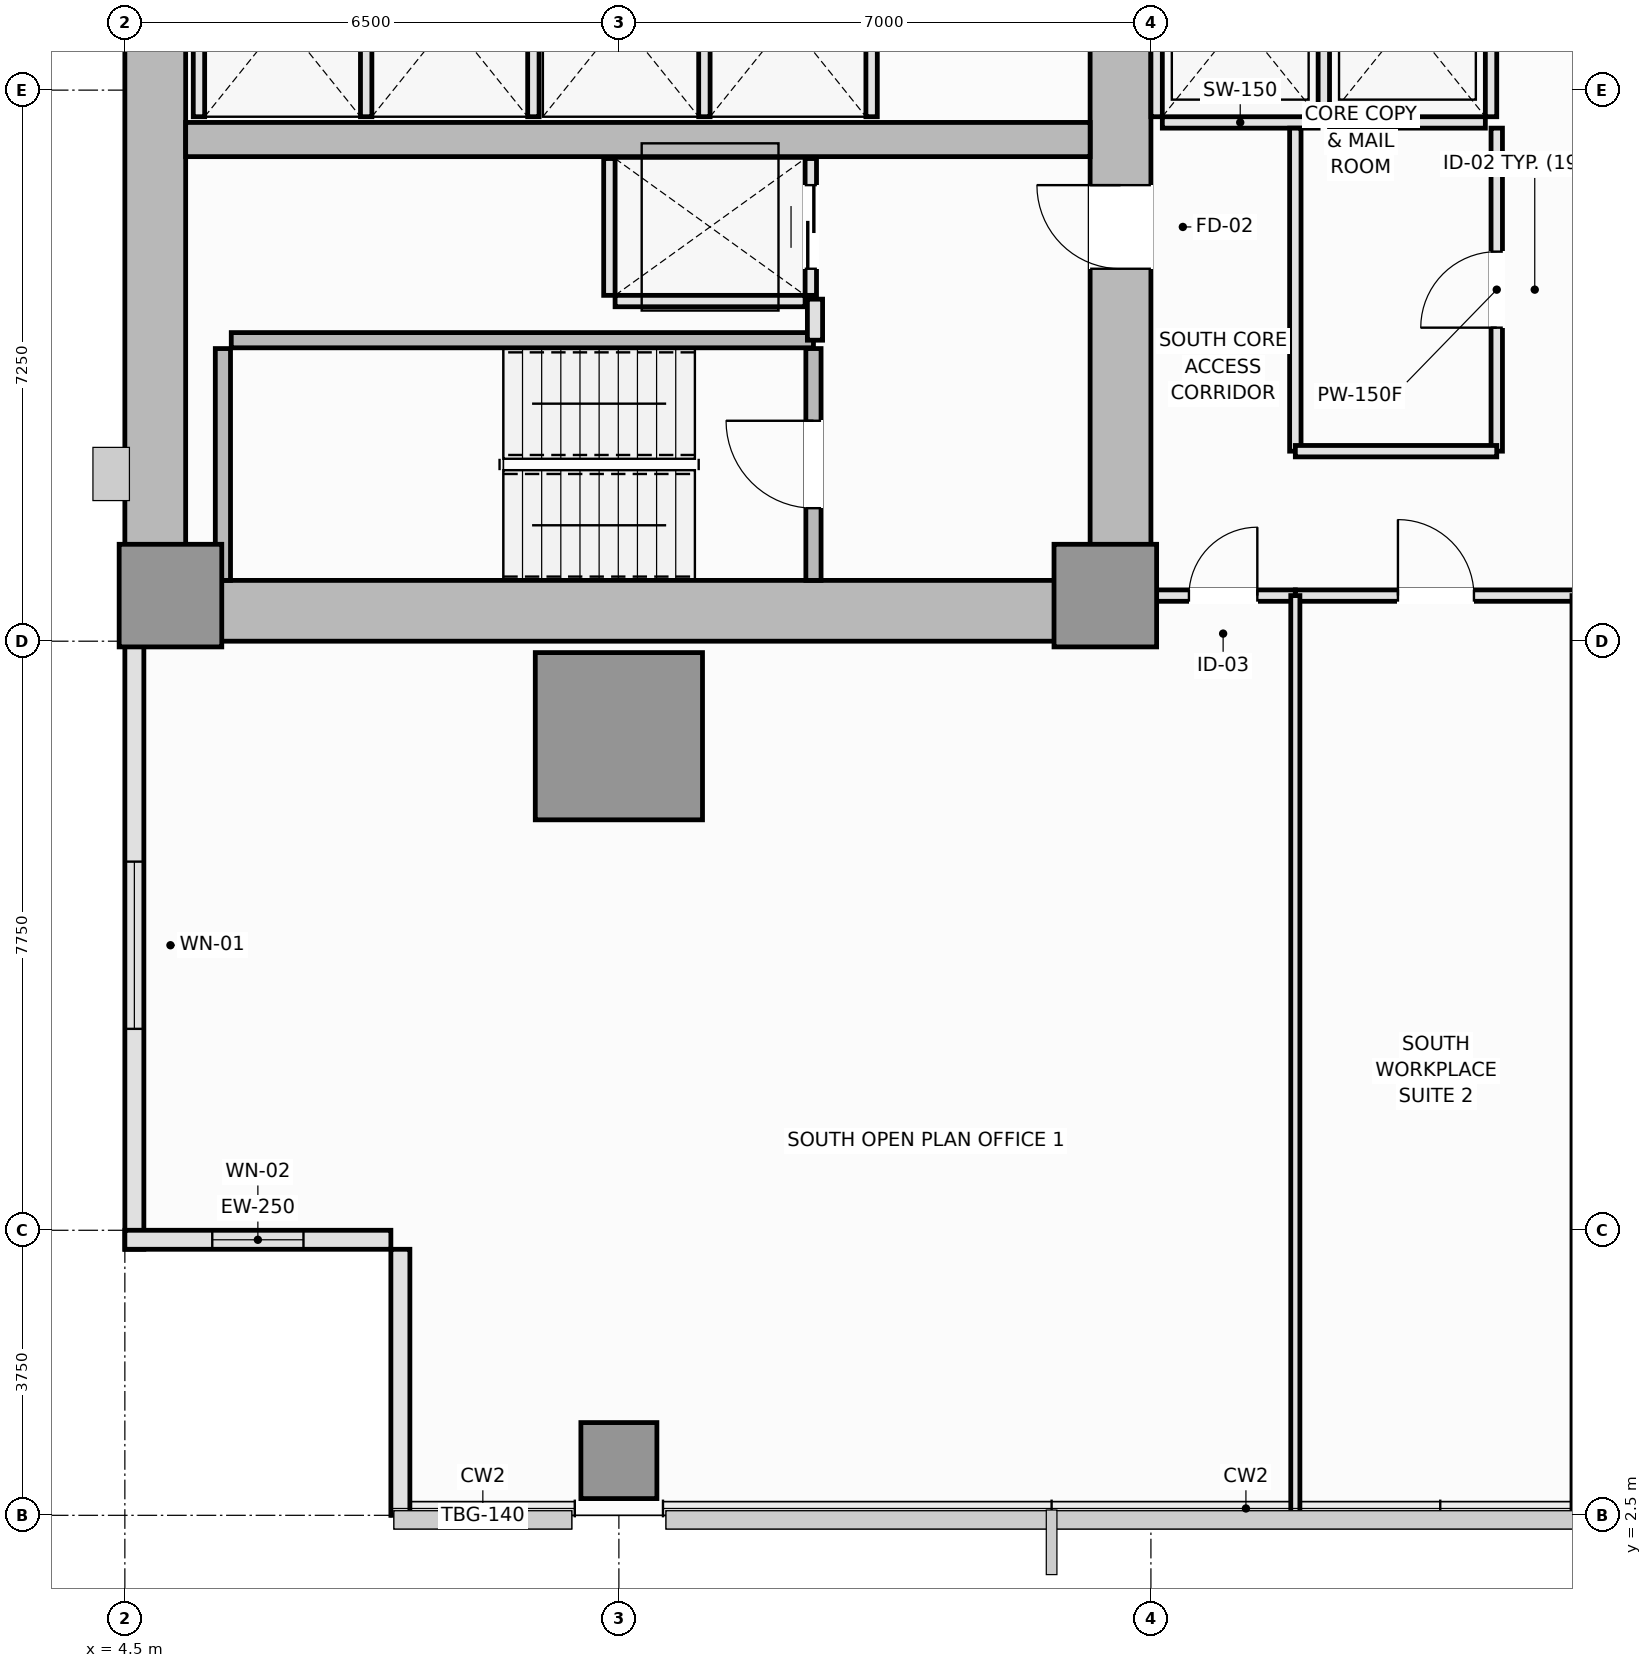
"""IFC4 building model, lengths in metres.
Left out: names, types, materials, properties, quantities, classifications, styles, units other than length and angle.
Written with IfcOpenShell. Run it as: python <this file> out.ifc"""

import sys

from ifc_helpers import new_model, si_unit, direction, frame, frame_2d, origin, origin_2d, place, context, subcontext, project, spatial, rectangle, extrude, element, fill, save


model = new_model("IFC4")
c1 = context("Model", 3, precision=1e-05, world=origin(), true_north=direction((0.0, 1.0)))
c2 = subcontext(c1, "Body", "Model", "MODEL_VIEW")
j1 = project(units=[si_unit("LENGTHUNIT", "METRE"), si_unit("PLANEANGLEUNIT", "RADIAN")], contexts=[c1])
p1 = place(None, origin())
s1 = spatial("IfcSite", under=j1, at=p1, CompositionType="ELEMENT")
p2 = place(p1, origin())
s2 = spatial("IfcBuilding", under=s1, at=p2, CompositionType="ELEMENT")
p3 = place(p2, frame((0.0, 0.0, 64.65)))
s3 = spatial("IfcBuildingStorey", under=s2, at=p3, CompositionType="ELEMENT", Elevation=64.65)
p4 = place(p3, frame((4.5, 14.4, 0.0), z_axis=(0.0, 0.0, 1.0), x_axis=(1.0, 0.0, 0.0)))
e1 = element("IfcWall", 1, at=p4, inside=s3, PredefinedType="SHEAR", context=c2, shape_type="SweptSolid", body=[
    extrude(rectangle(XDim=13.5, YDim=0.8, at=frame_2d((6.75, 0.0))), origin(), (0.0, 0.0, 1.0), 3.55),
])
p5 = place(p3, frame((4.9, 14.8, 0.0), z_axis=(0.0, 0.0, 1.0), x_axis=(0.0, 1.0, 0.0)))
e2 = element("IfcWall", 2, at=p5, inside=s3, PredefinedType="SHEAR", context=c2, shape_type="SweptSolid", body=[
    extrude(rectangle(XDim=20.9, YDim=0.8, at=frame_2d((10.45, 0.0))), origin(), (0.0, 0.0, 1.0), 3.55),
])
p6 = place(p3, frame((17.6, 14.8, 0.0), z_axis=(0.0, 0.0, 1.0), x_axis=(0.0, 1.0, 0.0)))
e3 = element("IfcWall", 3, at=p6, inside=s3, PredefinedType="SHEAR", context=c2, shape_type="SweptSolid", body=[
    extrude(rectangle(XDim=8.65, YDim=0.8, at=frame_2d((4.325, 0.0))), origin(), (0.0, 0.0, 1.0), 3.55),
])
p7 = place(p6, frame((4.1, 0.0, 0.0)))
e4 = element("IfcOpeningElement", 4, at=p7, cuts=e3, PredefinedType="OPENING", context=c2, shape_type="SweptSolid", body=[
    extrude(rectangle(XDim=1.1, YDim=2.15, at=frame_2d((0.55, 1.075))), frame((0.0, 0.41, 0.0), z_axis=(0.0, -1.0, 0.0), x_axis=(1.0, 0.0, 0.0)), (0.0, 0.0, 1.0), 0.82),
])
p8 = place(p3, frame((5.3, 20.6, 0.0), z_axis=(0.0, 0.0, 1.0), x_axis=(1.0, 0.0, 0.0)))
e5 = element("IfcWall", 5, at=p8, inside=s3, PredefinedType="SHEAR", context=c2, shape_type="SweptSolid", body=[
    extrude(rectangle(XDim=11.9, YDim=0.45, at=frame_2d((5.95, 0.0))), origin(), (0.0, 0.0, 1.0), 3.55),
])
for number, where, z_axis, x_axis in (
    (6, (5.1, 14.6, 0.0), (0.0, 0.0, 1.0), (1.0, 0.0, 0.0)),
    (7, (17.4, 14.6, 0.0), (0.0, 0.0, 1.0), (1.0, 0.0, 0.0)),
):
    element("IfcColumn", number, at=place(p3, frame(where, z_axis=z_axis, x_axis=x_axis)), inside=s3, PredefinedType="PILASTER", context=c2, shape_type="SweptSolid", body=[
        extrude(rectangle(XDim=1.35, YDim=1.35, at=origin_2d()), origin(), (0.0, 0.0, 1.0), 3.55),
    ])
p9 = place(p3, frame((11.0, 12.75, 0.0), z_axis=(0.0, 0.0, 1.0), x_axis=(1.0, 0.0, 0.0)))
e8 = element("IfcColumn", 8, at=p9, inside=s3, PredefinedType="COLUMN", context=c2, shape_type="SweptSolid", body=[
    extrude(rectangle(XDim=2.2, YDim=2.2, at=origin_2d()), origin(), (0.0, 0.0, 1.0), 3.55),
])
p10 = place(p3, frame((11.0, 3.22, 0.0), z_axis=(0.0, 0.0, 1.0), x_axis=(1.0, 0.0, 0.0)))
e9 = element("IfcColumn", 9, at=p10, inside=s3, PredefinedType="COLUMN", context=c2, shape_type="SweptSolid", body=[
    extrude(rectangle(XDim=1.0, YDim=1.0, at=origin_2d()), origin(), (0.0, 0.0, 1.0), 3.55),
])
p11 = place(p3, frame((4.625, 14.0, 0.0), z_axis=(0.0, 0.0, 1.0), x_axis=(0.0, -1.0, 0.0)))
e10 = element("IfcWall", 10, at=p11, inside=s3, PredefinedType="SOLIDWALL", context=c2, shape_type="SweptSolid", body=[
    extrude(rectangle(XDim=8.0, YDim=0.25, at=frame_2d((4.0, 0.0))), origin(), (0.0, 0.0, 1.0), 3.37),
])
p12 = place(p11, frame((2.9, 0.0, 0.9)))
e11 = element("IfcOpeningElement", 11, at=p12, cuts=e10, PredefinedType="OPENING", context=c2, shape_type="SweptSolid", body=[
    extrude(rectangle(XDim=2.2, YDim=1.8, at=frame_2d((1.1, 0.9))), frame((0.0, 0.135, 0.0), z_axis=(0.0, -1.0, 0.0), x_axis=(1.0, 0.0, 0.0)), (0.0, 0.0, 1.0), 0.27),
])
p13 = place(p3, frame((4.5, 6.125, 0.0), z_axis=(0.0, 0.0, 1.0), x_axis=(1.0, 0.0, 0.0)))
e12 = element("IfcWall", 12, at=p13, inside=s3, PredefinedType="SOLIDWALL", context=c2, shape_type="SweptSolid", body=[
    extrude(rectangle(XDim=3.5, YDim=0.25, at=frame_2d((1.75, 0.0))), origin(), (0.0, 0.0, 1.0), 3.37),
])
p14 = place(p13, frame((1.15, 0.0, 0.9)))
e13 = element("IfcOpeningElement", 13, at=p14, cuts=e12, PredefinedType="OPENING", context=c2, shape_type="SweptSolid", body=[
    extrude(rectangle(XDim=1.2, YDim=1.8, at=frame_2d((0.6, 0.9))), frame((0.0, 0.135, 0.0), z_axis=(0.0, -1.0, 0.0), x_axis=(1.0, 0.0, 0.0)), (0.0, 0.0, 1.0), 0.27),
])
p15 = place(p3, frame((8.125, 6.0, 0.0), z_axis=(0.0, 0.0, 1.0), x_axis=(0.0, -1.0, 0.0)))
e14 = element("IfcWall", 14, at=p15, inside=s3, PredefinedType="SOLIDWALL", context=c2, shape_type="SweptSolid", body=[
    extrude(rectangle(XDim=3.5, YDim=0.25, at=frame_2d((1.75, 0.0))), origin(), (0.0, 0.0, 1.0), 3.37),
])
p16 = place(p3, frame((5.79, 14.8, 0.0), z_axis=(0.0, 0.0, 1.0), x_axis=(0.0, 1.0, 0.0)))
e15 = element("IfcWall", 15, at=p16, inside=s3, PredefinedType="SOLIDWALL", context=c2, shape_type="SweptSolid", body=[
    extrude(rectangle(XDim=3.05, YDim=0.2, at=frame_2d((1.525, 0.0))), origin(), (0.0, 0.0, 1.0), 3.55),
])
p17 = place(p3, frame((5.9, 17.96, 0.0), z_axis=(0.0, 0.0, 1.0), x_axis=(1.0, 0.0, 0.0)))
e16 = element("IfcWall", 16, at=p17, inside=s3, PredefinedType="SOLIDWALL", context=c2, shape_type="SweptSolid", body=[
    extrude(rectangle(XDim=7.66, YDim=0.2, at=frame_2d((3.83, 0.0))), origin(), (0.0, 0.0, 1.0), 3.55),
])
p18 = place(p3, frame((13.56, 14.8, 0.0), z_axis=(0.0, 0.0, 1.0), x_axis=(0.0, 1.0, 0.0)))
e17 = element("IfcWall", 17, at=p18, inside=s3, PredefinedType="SOLIDWALL", context=c2, shape_type="SweptSolid", body=[
    extrude(rectangle(XDim=3.05, YDim=0.2, at=frame_2d((1.525, 0.0))), origin(), (0.0, 0.0, 1.0), 3.55),
])
p19 = place(p18, frame((0.95, 0.0, 0.0)))
e18 = element("IfcOpeningElement", 18, at=p19, cuts=e17, PredefinedType="OPENING", context=c2, shape_type="SweptSolid", body=[
    extrude(rectangle(XDim=1.15, YDim=2.15, at=frame_2d((0.575, 1.075))), frame((0.0, 0.11, 0.0), z_axis=(0.0, -1.0, 0.0), x_axis=(1.0, 0.0, 0.0)), (0.0, 0.0, 1.0), 0.22),
])
p20 = place(p3, frame((18.15, 20.825, 0.0), z_axis=(0.0, 0.0, 1.0), x_axis=(1.0, 0.0, 0.0)))
e19 = element("IfcWall", 19, at=p20, inside=s3, PredefinedType="PARTITIONING", context=c2, shape_type="SweptSolid", body=[
    extrude(rectangle(XDim=2.05, YDim=0.15, at=frame_2d((1.025, 0.0))), origin(), (0.0, 0.0, 1.0), 3.37),
])
for number, where, z_axis, x_axis in (
    (20, (18.075, 20.9, 0.0), (0.0, 0.0, 1.0), (0.0, 1.0, 0.0)),
    (21, (20.275, 20.9, 0.0), (0.0, 0.0, 1.0), (0.0, 1.0, 0.0)),
):
    element("IfcWall", number, at=place(p3, frame(where, z_axis=z_axis, x_axis=x_axis)), inside=s3, PredefinedType="PARTITIONING", context=c2, shape_type="SweptSolid", body=[
        extrude(rectangle(XDim=2.55, YDim=0.15, at=frame_2d((1.275, 0.0))), origin(), (0.0, 0.0, 1.0), 3.37),
    ])
p21 = place(p3, frame((20.35, 20.825, 0.0), z_axis=(0.0, 0.0, 1.0), x_axis=(1.0, 0.0, 0.0)))
e22 = element("IfcWall", 22, at=p21, inside=s3, PredefinedType="PARTITIONING", context=c2, shape_type="SweptSolid", body=[
    extrude(rectangle(XDim=2.05, YDim=0.15, at=frame_2d((1.025, 0.0))), origin(), (0.0, 0.0, 1.0), 3.37),
])
for number, where, z_axis, x_axis in (
    (23, (22.475, 20.9, 0.0), (0.0, 0.0, 1.0), (0.0, 1.0, 0.0)),
    (24, (5.475, 20.9, 0.0), (0.0, 0.0, 1.0), (0.0, 1.0, 0.0)),
    (25, (7.675, 20.9, 0.0), (0.0, 0.0, 1.0), (0.0, 1.0, 0.0)),
    (26, (9.875, 20.9, 0.0), (0.0, 0.0, 1.0), (0.0, 1.0, 0.0)),
    (27, (12.125, 20.9, 0.0), (0.0, 0.0, 1.0), (0.0, 1.0, 0.0)),
    (28, (14.325, 20.9, 0.0), (0.0, 0.0, 1.0), (0.0, 1.0, 0.0)),
):
    element("IfcWall", number, at=place(p3, frame(where, z_axis=z_axis, x_axis=x_axis)), inside=s3, PredefinedType="PARTITIONING", context=c2, shape_type="SweptSolid", body=[
        extrude(rectangle(XDim=2.55, YDim=0.15, at=frame_2d((1.275, 0.0))), origin(), (0.0, 0.0, 1.0), 3.37),
    ])
p22 = place(p3, frame((10.95, 18.475, 0.0), z_axis=(0.0, 0.0, 1.0), x_axis=(1.0, 0.0, 0.0)))
e29 = element("IfcWall", 29, at=p22, inside=s3, PredefinedType="PARTITIONING", context=c2, shape_type="SweptSolid", body=[
    extrude(rectangle(XDim=2.5, YDim=0.15, at=frame_2d((1.25, 0.0))), origin(), (0.0, 0.0, 1.0), 3.37),
])
p23 = place(p3, frame((10.875, 18.55, 0.0), z_axis=(0.0, 0.0, 1.0), x_axis=(0.0, 1.0, 0.0)))
e30 = element("IfcWall", 30, at=p23, inside=s3, PredefinedType="PARTITIONING", context=c2, shape_type="SweptSolid", body=[
    extrude(rectangle(XDim=1.8, YDim=0.15, at=frame_2d((0.9, 0.0))), origin(), (0.0, 0.0, 1.0), 3.37),
])
p24 = place(p3, frame((13.525, 18.55, 0.0), z_axis=(0.0, 0.0, 1.0), x_axis=(0.0, 1.0, 0.0)))
e31 = element("IfcWall", 31, at=p24, inside=s3, PredefinedType="PARTITIONING", context=c2, shape_type="SweptSolid", body=[
    extrude(rectangle(XDim=1.8, YDim=0.15, at=frame_2d((0.9, 0.0))), origin(), (0.0, 0.0, 1.0), 3.37),
])
p25 = place(p24, frame((0.35, 0.0, 0.0)))
e32 = element("IfcOpeningElement", 32, at=p25, cuts=e31, PredefinedType="OPENING", context=c2, shape_type="SweptSolid", body=[
    extrude(rectangle(XDim=1.1, YDim=2.2, at=frame_2d((0.55, 1.1))), frame((0.0, 0.085, 0.0), z_axis=(0.0, -1.0, 0.0), x_axis=(1.0, 0.0, 0.0)), (0.0, 0.0, 1.0), 0.17),
])
p26 = place(p3, frame((13.58, 17.96, 0.0), z_axis=(0.0, 0.0, 1.0), x_axis=(0.0, 1.0, 0.0)))
e33 = element("IfcWall", 33, at=p26, inside=s3, PredefinedType="PARTITIONING", context=c2, shape_type="SweptSolid", body=[
    extrude(rectangle(XDim=0.54, YDim=0.2, at=frame_2d((0.27, 0.0))), origin(), (0.0, 0.0, 1.0), 3.37),
])
p27 = place(p3, frame((22.55, 16.5, 0.0), z_axis=(0.0, 0.0, 1.0), x_axis=(0.0, 1.0, 0.0)))
e34 = element("IfcWall", 34, at=p27, inside=s3, PredefinedType="PARTITIONING", context=c2, shape_type="SweptSolid", body=[
    extrude(rectangle(XDim=4.25, YDim=0.15, at=frame_2d((2.125, 0.0))), origin(), (0.0, 0.0, 1.0), 3.01),
])
p28 = place(p27, frame((1.625, 0.0, 0.0)))
e35 = element("IfcOpeningElement", 35, at=p28, cuts=e34, PredefinedType="OPENING", context=c2, shape_type="SweptSolid", body=[
    extrude(rectangle(XDim=1.0, YDim=2.15, at=frame_2d((0.5, 1.075))), frame((0.0, 0.085, 0.0), z_axis=(0.0, -1.0, 0.0), x_axis=(1.0, 0.0, 0.0)), (0.0, 0.0, 1.0), 0.17),
])
p29 = place(p3, frame((19.9, 16.5, 0.0), z_axis=(0.0, 0.0, 1.0), x_axis=(0.0, 1.0, 0.0)))
e36 = element("IfcWall", 36, at=p29, inside=s3, PredefinedType="PARTITIONING", context=c2, shape_type="SweptSolid", body=[
    extrude(rectangle(XDim=4.25, YDim=0.15, at=frame_2d((2.125, 0.0))), origin(), (0.0, 0.0, 1.0), 3.37),
])
p30 = place(p3, frame((19.9, 16.5, 0.0), z_axis=(0.0, 0.0, 1.0), x_axis=(1.0, 0.0, 0.0)))
e37 = element("IfcWall", 37, at=p30, inside=s3, PredefinedType="PARTITIONING", context=c2, shape_type="SweptSolid", body=[
    extrude(rectangle(XDim=2.65, YDim=0.15, at=frame_2d((1.325, 0.0))), origin(), (0.0, 0.0, 1.0), 3.37),
])
p31 = place(p3, frame((18.0, 14.6, 0.0), z_axis=(0.0, 0.0, 1.0), x_axis=(1.0, 0.0, 0.0)))
e38 = element("IfcWall", 38, at=p31, inside=s3, PredefinedType="PARTITIONING", context=c2, shape_type="SweptSolid", body=[
    extrude(rectangle(XDim=1.9, YDim=0.15, at=frame_2d((0.95, 0.0))), origin(), (0.0, 0.0, 1.0), 3.37),
])
p32 = place(p31, frame((0.5, 0.0, 0.0)))
e39 = element("IfcOpeningElement", 39, at=p32, cuts=e38, PredefinedType="OPENING", context=c2, shape_type="SweptSolid", body=[
    extrude(rectangle(XDim=0.9, YDim=2.1, at=frame_2d((0.45, 1.05))), frame((0.0, 0.085, 0.0), z_axis=(0.0, -1.0, 0.0), x_axis=(1.0, 0.0, 0.0)), (0.0, 0.0, 1.0), 0.17),
])
p33 = place(p3, frame((19.9, 14.6, 0.0), z_axis=(0.0, 0.0, 1.0), x_axis=(1.0, 0.0, 0.0)))
e40 = element("IfcWall", 40, at=p33, inside=s3, PredefinedType="PARTITIONING", context=c2, shape_type="SweptSolid", body=[
    extrude(rectangle(XDim=3.7, YDim=0.15, at=frame_2d((1.85, 0.0))), origin(), (0.0, 0.0, 1.0), 3.37),
])
p34 = place(p33, frame((1.35, 0.0, 0.0)))
e41 = element("IfcOpeningElement", 41, at=p34, cuts=e40, PredefinedType="OPENING", context=c2, shape_type="SweptSolid", body=[
    extrude(rectangle(XDim=1.0, YDim=2.15, at=frame_2d((0.5, 1.075))), frame((0.0, 0.085, 0.0), z_axis=(0.0, -1.0, 0.0), x_axis=(1.0, 0.0, 0.0)), (0.0, 0.0, 1.0), 0.17),
])
for number, where, z_axis, x_axis in (
    (42, (19.9, 2.51, 0.0), (0.0, 0.0, 1.0), (0.0, 1.0, 0.0)),
    (43, (23.6, 2.51, 0.0), (0.0, 0.0, 1.0), (0.0, 1.0, 0.0)),
):
    element("IfcWall", number, at=place(p3, frame(where, z_axis=z_axis, x_axis=x_axis)), inside=s3, PredefinedType="PARTITIONING", context=c2, shape_type="SweptSolid", body=[
        extrude(rectangle(XDim=12.09, YDim=0.12, at=frame_2d((6.045, 0.0))), origin(), (0.0, 0.0, 1.0), 3.37),
    ])
p35 = place(p12, origin())
e44 = element("IfcWindow", 44, at=p35, inside=s3, PartitioningType="SINGLE_PANEL", PredefinedType="WINDOW", context=c2, shape_type="SweptSolid", body=[
    extrude(rectangle(XDim=2.2, YDim=1.8, at=frame_2d((1.1, 0.9))), frame((0.0, 0.03, 0.0), z_axis=(0.0, -1.0, 0.0), x_axis=(1.0, 0.0, 0.0)), (0.0, 0.0, 1.0), 0.06),
])
fill(e11, e44)
p36 = place(p14, origin())
e45 = element("IfcWindow", 45, at=p36, inside=s3, PartitioningType="SINGLE_PANEL", PredefinedType="WINDOW", context=c2, shape_type="SweptSolid", body=[
    extrude(rectangle(XDim=1.2, YDim=1.8, at=frame_2d((0.6, 0.9))), frame((0.0, 0.03, 0.0), z_axis=(0.0, -1.0, 0.0), x_axis=(1.0, 0.0, 0.0)), (0.0, 0.0, 1.0), 0.06),
])
fill(e13, e45)
p37 = place(p19, origin())
e46 = element("IfcDoor", 46, at=p37, inside=s3, OperationType="SINGLE_SWING_RIGHT", PredefinedType="DOOR", context=c2, shape_type="SweptSolid", body=[
    extrude(rectangle(XDim=1.15, YDim=2.15, at=frame_2d((0.575, 1.075))), frame((0.0, 0.025, 0.0), z_axis=(0.0, -1.0, 0.0), x_axis=(1.0, 0.0, 0.0)), (0.0, 0.0, 1.0), 0.05),
])
fill(e18, e46)
p38 = place(p25, origin())
e47 = element("IfcDoor", 47, at=p38, inside=s3, OperationType="DOUBLE_DOOR_SLIDING", PredefinedType="DOOR", context=c2, shape_type="SweptSolid", body=[
    extrude(rectangle(XDim=1.1, YDim=2.2, at=frame_2d((0.55, 1.1))), frame((0.0, 0.025, 0.0), z_axis=(0.0, -1.0, 0.0), x_axis=(1.0, 0.0, 0.0)), (0.0, 0.0, 1.0), 0.05),
])
fill(e32, e47)
p39 = place(p7, origin())
e48 = element("IfcDoor", 48, at=p39, inside=s3, OperationType="SINGLE_SWING_RIGHT", PredefinedType="DOOR", context=c2, shape_type="SweptSolid", body=[
    extrude(rectangle(XDim=1.1, YDim=2.15, at=frame_2d((0.55, 1.075))), frame((0.0, 0.025, 0.0), z_axis=(0.0, -1.0, 0.0), x_axis=(1.0, 0.0, 0.0)), (0.0, 0.0, 1.0), 0.05),
])
fill(e4, e48)
p40 = place(p28, origin())
e49 = element("IfcDoor", 49, at=p40, inside=s3, OperationType="SINGLE_SWING_LEFT", PredefinedType="DOOR", context=c2, shape_type="SweptSolid", body=[
    extrude(rectangle(XDim=1.0, YDim=2.15, at=frame_2d((0.5, 1.075))), frame((0.0, 0.025, 0.0), z_axis=(0.0, -1.0, 0.0), x_axis=(1.0, 0.0, 0.0)), (0.0, 0.0, 1.0), 0.05),
])
fill(e35, e49)
p41 = place(p32, origin())
e50 = element("IfcDoor", 50, at=p41, inside=s3, OperationType="SINGLE_SWING_RIGHT", PredefinedType="DOOR", context=c2, shape_type="SweptSolid", body=[
    extrude(rectangle(XDim=0.9, YDim=2.1, at=frame_2d((0.45, 1.05))), frame((0.0, 0.025, 0.0), z_axis=(0.0, -1.0, 0.0), x_axis=(1.0, 0.0, 0.0)), (0.0, 0.0, 1.0), 0.05),
])
fill(e39, e50)
p42 = place(p34, origin())
e51 = element("IfcDoor", 51, at=p42, inside=s3, OperationType="SINGLE_SWING_LEFT", PredefinedType="DOOR", context=c2, shape_type="SweptSolid", body=[
    extrude(rectangle(XDim=1.0, YDim=2.15, at=frame_2d((0.5, 1.075))), frame((0.0, 0.025, 0.0), z_axis=(0.0, -1.0, 0.0), x_axis=(1.0, 0.0, 0.0)), (0.0, 0.0, 1.0), 0.05),
])
fill(e41, e51)
save(model, sys.argv[1])
